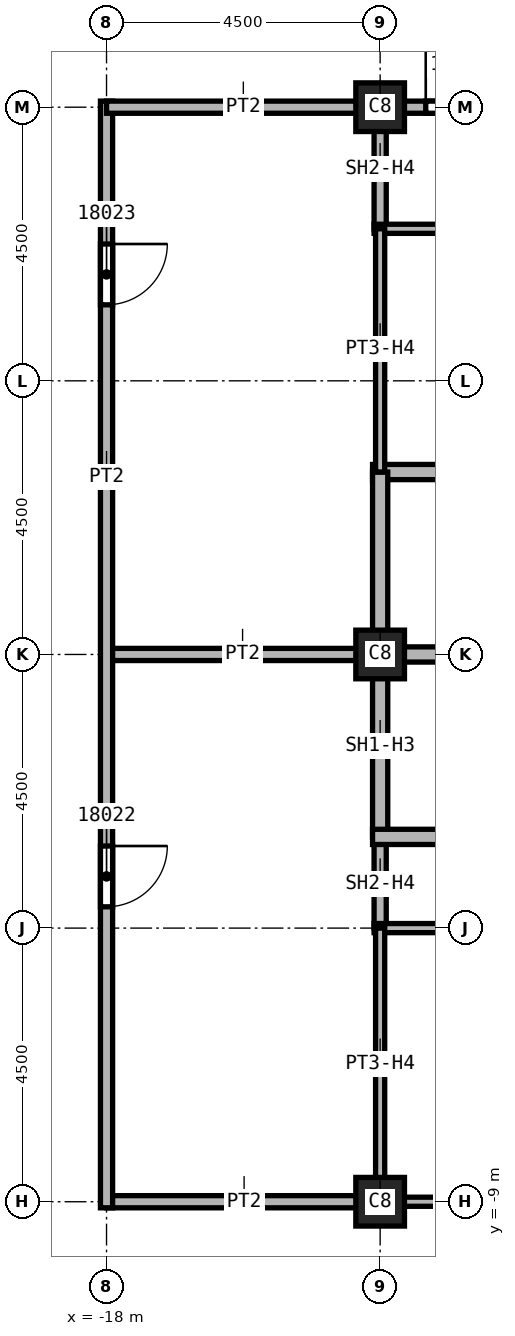
"""IFC4 building model, lengths in metres.
Left out: names, types, materials, properties, quantities, classifications, styles, units other than length and angle.
Written with IfcOpenShell. Run it as: python <this file> out.ifc"""

import sys

from ifc_helpers import new_model, si_unit, direction, frame, frame_2d, origin, origin_2d, place, context, subcontext, project, spatial, rectangle, extrude, element, fill, save


model = new_model("IFC4")
c1 = context("Model", 3, precision=1e-05, world=origin(), true_north=direction((0.0, 1.0)))
c2 = subcontext(c1, "Body", "Model", "MODEL_VIEW")
j1 = project(units=[si_unit("LENGTHUNIT", "METRE"), si_unit("PLANEANGLEUNIT", "RADIAN")], contexts=[c1])
p1 = place(None, origin())
s1 = spatial("IfcSite", under=j1, at=p1, CompositionType="ELEMENT")
p2 = place(p1, origin())
s2 = spatial("IfcBuilding", under=s1, at=p2, CompositionType="ELEMENT")
p3 = place(p2, frame((0.0, 0.0, 266.0)))
s3 = spatial("IfcBuildingStorey", under=s2, at=p3, CompositionType="ELEMENT", Elevation=266.0)
for number, where, z_axis, x_axis in (
    (1, (-13.5, 0.0, 0.0), (0.0, 0.0, 1.0), (1.0, 0.0, 0.0)),
    (2, (-13.5, 9.0, 0.0), (0.0, 0.0, 1.0), (1.0, 0.0, 0.0)),
    (3, (-13.5, -9.0, 0.0), (0.0, 0.0, 1.0), (1.0, 0.0, 0.0)),
):
    element("IfcColumn", number, at=place(p3, frame(where, z_axis=z_axis, x_axis=x_axis)), inside=s3, PredefinedType="COLUMN", context=c2, shape_type="SweptSolid", body=[
        extrude(rectangle(XDim=0.8, YDim=0.8, at=origin_2d()), origin(), (0.0, 0.0, 1.0), 3.72),
    ])
for number, where, z_axis, x_axis in (
    (4, (-18.0, -9.0, 0.0), (0.0, 0.0, 1.0), (1.0, 0.0, 0.0)),
    (5, (-18.0, 0.0, 0.0), (0.0, 0.0, 1.0), (1.0, 0.0, 0.0)),
):
    element("IfcWall", number, at=place(p3, frame(where, z_axis=z_axis, x_axis=x_axis)), inside=s3, PredefinedType="PARTITIONING", context=c2, shape_type="SweptSolid", body=[
        extrude(rectangle(XDim=4.5, YDim=0.2, at=frame_2d((2.25, 0.0))), origin(), (0.0, 0.0, 1.0), 3.72),
    ])
p4 = place(p3, frame((-18.0, 9.1, 0.0), z_axis=(0.0, 0.0, 1.0), x_axis=(0.0, -1.0, 0.0)))
e6 = element("IfcWall", 6, at=p4, inside=s3, PredefinedType="PARTITIONING", context=c2, shape_type="SweptSolid", body=[
    extrude(rectangle(XDim=18.2, YDim=0.2, at=frame_2d((9.1, 0.0))), origin(), (0.0, 0.0, 1.0), 3.72),
])
p5 = place(p4, frame((12.25, 0.0, 0.0)))
e7 = element("IfcOpeningElement", 7, at=p5, cuts=e6, PredefinedType="OPENING", context=c2, shape_type="SweptSolid", body=[
    extrude(rectangle(XDim=1.0, YDim=2.1, at=frame_2d((0.5, 1.05))), frame((0.0, 0.1, 0.0), z_axis=(0.0, -1.0, 0.0), x_axis=(1.0, 0.0, 0.0)), (0.0, 0.0, 1.0), 0.2),
])
p6 = place(p4, frame((2.35, 0.0, 0.0)))
e8 = element("IfcOpeningElement", 8, at=p6, cuts=e6, PredefinedType="OPENING", context=c2, shape_type="SweptSolid", body=[
    extrude(rectangle(XDim=1.0, YDim=2.1, at=frame_2d((0.5, 1.05))), frame((0.0, 0.1, 0.0), z_axis=(0.0, -1.0, 0.0), x_axis=(1.0, 0.0, 0.0)), (0.0, 0.0, 1.0), 0.2),
])
p7 = place(p3, frame((-13.5, 9.0, 0.0), z_axis=(0.0, 0.0, 1.0), x_axis=(-1.0, 0.0, 0.0)))
e9 = element("IfcWall", 9, at=p7, inside=s3, PredefinedType="PARTITIONING", context=c2, shape_type="SweptSolid", body=[
    extrude(rectangle(XDim=4.5, YDim=0.2, at=frame_2d((2.25, 0.0))), origin(), (0.0, 0.0, 1.0), 3.72),
])
p8 = place(p3, frame((-13.6, 9.0, 0.0), z_axis=(0.0, 0.0, 1.0), x_axis=(1.0, 0.0, 0.0)))
e10 = element("IfcWall", 10, at=p8, inside=s3, PredefinedType="SOLIDWALL", context=c2, shape_type="SweptSolid", body=[
    extrude(rectangle(XDim=3.1, YDim=0.2, at=frame_2d((1.55, 0.0))), origin(), (0.0, 0.0, 1.0), 3.042),
])
p9 = place(p8, frame((0.85, 0.0, 0.0)))
e11 = element("IfcOpeningElement", 11, at=p9, cuts=e10, PredefinedType="OPENING", context=c2, shape_type="SweptSolid", body=[
    extrude(rectangle(XDim=1.1, YDim=2.1, at=frame_2d((0.55, 1.05))), frame((0.0, 0.1, 0.0), z_axis=(0.0, -1.0, 0.0), x_axis=(1.0, 0.0, 0.0)), (0.0, 0.0, 1.0), 0.2),
])
p10 = place(p3, frame((-13.5, -4.5, 0.0), z_axis=(0.0, 0.0, 1.0), x_axis=(0.0, 1.0, 0.0)))
e12 = element("IfcWall", 12, at=p10, inside=s3, PredefinedType="SOLIDWALL", context=c2, shape_type="SweptSolid", body=[
    extrude(rectangle(XDim=1.5, YDim=0.2, at=frame_2d((0.75, 0.0))), origin(), (0.0, 0.0, 1.0), 3.042),
])
p11 = place(p3, frame((-13.5, 7.0, 0.0), z_axis=(0.0, 0.0, 1.0), x_axis=(0.0, 1.0, 0.0)))
e13 = element("IfcWall", 13, at=p11, inside=s3, PredefinedType="SOLIDWALL", context=c2, shape_type="SweptSolid", body=[
    extrude(rectangle(XDim=2.1, YDim=0.2, at=frame_2d((1.05, 0.0))), origin(), (0.0, 0.0, 1.0), 3.042),
])
p12 = place(p3, frame((-13.625, 0.0, 0.0), z_axis=(0.0, 0.0, 1.0), x_axis=(1.0, 0.0, 0.0)))
e14 = element("IfcWall", 14, at=p12, inside=s3, PredefinedType="SOLIDWALL", context=c2, shape_type="SweptSolid", body=[
    extrude(rectangle(XDim=3.125, YDim=0.25, at=frame_2d((1.562, 0.0))), origin(), (0.0, 0.0, 1.0), 3.72),
])
p13 = place(p3, frame((-13.625, 3.0, 0.0), z_axis=(0.0, 0.0, 1.0), x_axis=(1.0, 0.0, 0.0)))
e15 = element("IfcWall", 15, at=p13, inside=s3, PredefinedType="SOLIDWALL", context=c2, shape_type="SweptSolid", body=[
    extrude(rectangle(XDim=9.25, YDim=0.25, at=frame_2d((4.625, 0.0))), origin(), (0.0, 0.0, 1.0), 3.72),
])
p14 = place(p13, frame((3.25, 0.0, 0.0)))
e16 = element("IfcOpeningElement", 16, at=p14, cuts=e15, PredefinedType="OPENING", context=c2, shape_type="SweptSolid", body=[
    extrude(rectangle(XDim=1.1, YDim=2.1, at=frame_2d((0.55, 1.05))), frame((0.0, 0.125, 0.0), z_axis=(0.0, -1.0, 0.0), x_axis=(1.0, 0.0, 0.0)), (0.0, 0.0, 1.0), 0.25),
])
p15 = place(p3, frame((-13.5, -3.0, 0.0), z_axis=(0.0, 0.0, 1.0), x_axis=(0.0, 1.0, 0.0)))
e17 = element("IfcWall", 17, at=p15, inside=s3, PredefinedType="SOLIDWALL", context=c2, shape_type="SweptSolid", body=[
    extrude(rectangle(XDim=6.0, YDim=0.25, at=frame_2d((3.0, 0.0))), origin(), (0.0, 0.0, 1.0), 3.042),
])
p16 = place(p3, frame((-13.625, -3.0, 0.0), z_axis=(0.0, 0.0, 1.0), x_axis=(1.0, 0.0, 0.0)))
e18 = element("IfcWall", 18, at=p16, inside=s3, PredefinedType="SOLIDWALL", context=c2, shape_type="SweptSolid", body=[
    extrude(rectangle(XDim=6.125, YDim=0.25, at=frame_2d((3.062, 0.0))), origin(), (0.0, 0.0, 1.0), 3.72),
])
p17 = place(p16, frame((3.25, 0.0, 0.0)))
e19 = element("IfcOpeningElement", 19, at=p17, cuts=e18, PredefinedType="OPENING", context=c2, shape_type="SweptSolid", body=[
    extrude(rectangle(XDim=1.1, YDim=2.1, at=frame_2d((0.55, 1.05))), frame((0.0, 0.125, 0.0), z_axis=(0.0, -1.0, 0.0), x_axis=(1.0, 0.0, 0.0)), (0.0, 0.0, 1.0), 0.25),
])
for number, where, z_axis, x_axis in (
    (20, (-13.6, -4.5, 0.0), (0.0, 0.0, 1.0), (1.0, 0.0, 0.0)),
    (21, (-13.6, 7.0, 0.0), (0.0, 0.0, 1.0), (1.0, 0.0, 0.0)),
):
    element("IfcWall", number, at=place(p3, frame(where, z_axis=z_axis, x_axis=x_axis)), inside=s3, PredefinedType="PARTITIONING", context=c2, shape_type="SweptSolid", body=[
        extrude(rectangle(XDim=3.1, YDim=0.15, at=frame_2d((1.55, 0.0))), origin(), (0.0, 0.0, 1.0), 3.72),
    ])
p18 = place(p3, frame((-13.5, -9.1, 0.0), z_axis=(0.0, 0.0, 1.0), x_axis=(0.0, 1.0, 0.0)))
e22 = element("IfcWall", 22, at=p18, inside=s3, PredefinedType="PARTITIONING", context=c2, shape_type="SweptSolid", body=[
    extrude(rectangle(XDim=4.6, YDim=0.15, at=frame_2d((2.3, 0.0))), origin(), (0.0, 0.0, 1.0), 3.042),
])
p19 = place(p3, frame((-13.5, 3.0, 0.0), z_axis=(0.0, 0.0, 1.0), x_axis=(0.0, 1.0, 0.0)))
e23 = element("IfcWall", 23, at=p19, inside=s3, PredefinedType="PARTITIONING", context=c2, shape_type="SweptSolid", body=[
    extrude(rectangle(XDim=4.0, YDim=0.15, at=frame_2d((2.0, 0.0))), origin(), (0.0, 0.0, 1.0), 3.042),
])
p20 = place(p3, frame((-10.5, -9.0, 0.0), z_axis=(0.0, 0.0, 1.0), x_axis=(-1.0, 0.0, 0.0)))
e24 = element("IfcWall", 24, at=p20, inside=s3, PredefinedType="PARTITIONING", context=c2, shape_type="SweptSolid", body=[
    extrude(rectangle(XDim=3.075, YDim=0.15, at=frame_2d((1.538, 0.0))), origin(), (0.0, 0.0, 1.0), 3.042),
])
p21 = place(p9, origin())
e25 = element("IfcDoor", 25, at=p21, inside=s3, OperationType="SINGLE_SWING_RIGHT", PredefinedType="DOOR", context=c2, shape_type="SweptSolid", body=[
    extrude(rectangle(XDim=1.1, YDim=2.1, at=frame_2d((0.55, 1.05))), frame((0.0, 0.025, 0.0), z_axis=(0.0, -1.0, 0.0), x_axis=(1.0, 0.0, 0.0)), (0.0, 0.0, 1.0), 0.05),
])
fill(e11, e25)
p22 = place(p5, origin())
e26 = element("IfcDoor", 26, at=p22, inside=s3, OperationType="SINGLE_SWING_LEFT", PredefinedType="DOOR", context=c2, shape_type="SweptSolid", body=[
    extrude(rectangle(XDim=1.0, YDim=2.1, at=frame_2d((0.5, 1.05))), frame((0.0, 0.025, 0.0), z_axis=(0.0, -1.0, 0.0), x_axis=(1.0, 0.0, 0.0)), (0.0, 0.0, 1.0), 0.05),
])
fill(e7, e26)
p23 = place(p6, origin())
e27 = element("IfcDoor", 27, at=p23, inside=s3, OperationType="SINGLE_SWING_RIGHT", PredefinedType="DOOR", context=c2, shape_type="SweptSolid", body=[
    extrude(rectangle(XDim=1.0, YDim=2.1, at=frame_2d((0.5, 1.05))), frame((0.0, 0.025, 0.0), z_axis=(0.0, -1.0, 0.0), x_axis=(1.0, 0.0, 0.0)), (0.0, 0.0, 1.0), 0.05),
])
fill(e8, e27)
save(model, sys.argv[1])
